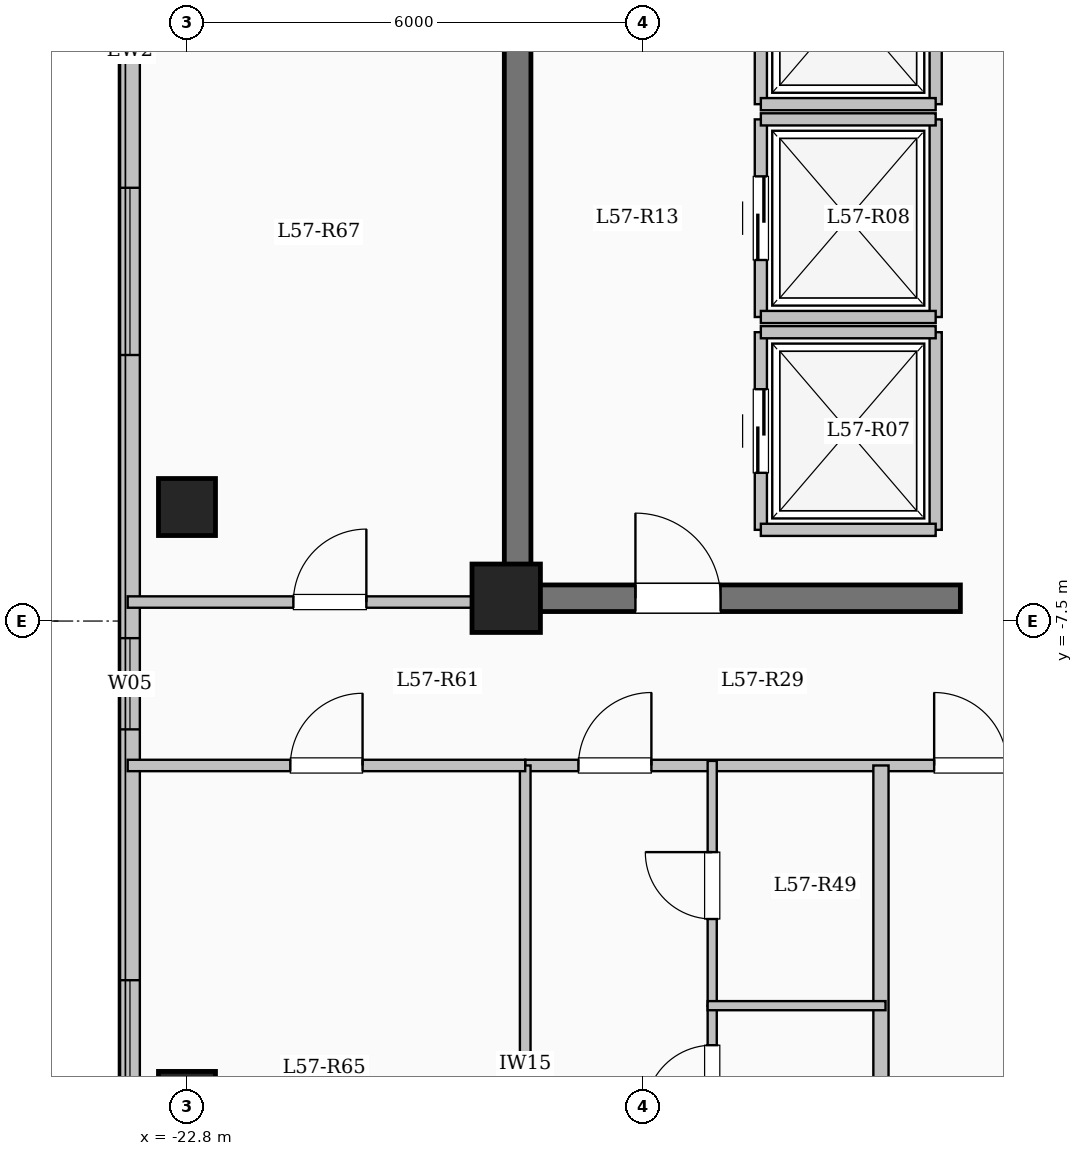
"""IFC4 building model, lengths in metres.
Left out: names, types, materials, properties, quantities, classifications, styles, units other than length and angle.
Written with IfcOpenShell. Run it as: python <this file> out.ifc"""

import sys

from ifc_helpers import new_model, si_unit, direction, frame, frame_2d, origin, origin_2d, place, context, subcontext, project, spatial, rectangle, extrude, element, fill, save


model = new_model("IFC4")
c1 = context("Model", 3, precision=1e-05, world=origin(), true_north=direction((0.0, 1.0)))
c2 = subcontext(c1, "Body", "Model", "MODEL_VIEW")
j1 = project(units=[si_unit("LENGTHUNIT", "METRE"), si_unit("PLANEANGLEUNIT", "RADIAN")], contexts=[c1])
p1 = place(None, origin())
s1 = spatial("IfcSite", under=j1, at=p1, CompositionType="ELEMENT")
p2 = place(p1, origin())
s2 = spatial("IfcBuilding", under=s1, at=p2, CompositionType="ELEMENT")
p3 = place(p2, frame((0.0, 0.0, 210.35)))
s3 = spatial("IfcBuildingStorey", under=s2, at=p3, CompositionType="ELEMENT", Elevation=210.35)
p4 = place(p3, frame((-18.6, -7.2, 0.0), z_axis=(0.0, 0.0, 1.0), x_axis=(1.0, 0.0, 0.0)))
e1 = element("IfcColumn", 1, at=p4, inside=s3, PredefinedType="COLUMN", context=c2, shape_type="SweptSolid", body=[
    extrude(rectangle(XDim=0.9, YDim=0.9, at=origin_2d()), origin(), (0.0, 0.0, 1.0), 3.35),
])
for number, where, z_axis, x_axis in (
    (2, (-22.8, -13.8, 0.0), (0.0, 0.0, 1.0), (1.0, 0.0, 0.0)),
    (3, (-22.8, -6.0, 0.0), (0.0, 0.0, 1.0), (1.0, 0.0, 0.0)),
):
    element("IfcColumn", number, at=place(p3, frame(where, z_axis=z_axis, x_axis=x_axis)), inside=s3, PredefinedType="COLUMN", context=c2, shape_type="SweptSolid", body=[
        extrude(rectangle(XDim=0.75, YDim=0.75, at=origin_2d()), origin(), (0.0, 0.0, 1.0), 3.35),
    ])
p5 = place(p3, frame((-23.55, -17.25, 0.0), z_axis=(0.0, 0.0, 1.0), x_axis=(0.0, 1.0, 0.0)))
e4 = element("IfcWall", 4, at=p5, inside=s3, PredefinedType="SOLIDWALL", context=c2, shape_type="SweptSolid", body=[
    extrude(rectangle(XDim=34.5, YDim=0.26, at=frame_2d((17.25, 0.0))), origin(), (0.0, 0.0, 1.0), 3.1),
])
p6 = place(p5, frame((2.825, 0.0, 0.9)))
e5 = element("IfcOpeningElement", 5, at=p6, cuts=e4, PredefinedType="OPENING", context=c2, shape_type="SweptSolid", body=[
    extrude(rectangle(XDim=2.2, YDim=1.75, at=frame_2d((1.1, 0.875))), frame((0.0, 0.14, 0.0), z_axis=(0.0, -1.0, 0.0), x_axis=(1.0, 0.0, 0.0)), (0.0, 0.0, 1.0), 0.28),
])
p7 = place(p5, frame((8.325, 0.0, 0.95)))
e6 = element("IfcOpeningElement", 6, at=p7, cuts=e4, PredefinedType="OPENING", context=c2, shape_type="SweptSolid", body=[
    extrude(rectangle(XDim=1.2, YDim=1.5, at=frame_2d((0.6, 0.75))), frame((0.0, 0.14, 0.0), z_axis=(0.0, -1.0, 0.0), x_axis=(1.0, 0.0, 0.0)), (0.0, 0.0, 1.0), 0.28),
])
p8 = place(p5, frame((13.25, 0.0, 0.9)))
e7 = element("IfcOpeningElement", 7, at=p8, cuts=e4, PredefinedType="OPENING", context=c2, shape_type="SweptSolid", body=[
    extrude(rectangle(XDim=2.2, YDim=1.75, at=frame_2d((1.1, 0.875))), frame((0.0, 0.14, 0.0), z_axis=(0.0, -1.0, 0.0), x_axis=(1.0, 0.0, 0.0)), (0.0, 0.0, 1.0), 0.28),
])
p9 = place(p5, frame((19.65, 0.0, 0.9)))
e8 = element("IfcOpeningElement", 8, at=p9, cuts=e4, PredefinedType="OPENING", context=c2, shape_type="SweptSolid", body=[
    extrude(rectangle(XDim=1.65, YDim=1.6, at=frame_2d((0.825, 0.8))), frame((0.0, 0.14, 0.0), z_axis=(0.0, -1.0, 0.0), x_axis=(1.0, 0.0, 0.0)), (0.0, 0.0, 1.0), 0.28),
])
p10 = place(p5, frame((24.125, 0.0, 0.9)))
e9 = element("IfcOpeningElement", 9, at=p10, cuts=e4, PredefinedType="OPENING", context=c2, shape_type="SweptSolid", body=[
    extrude(rectangle(XDim=2.0, YDim=1.7, at=frame_2d((1.0, 0.85))), frame((0.0, 0.14, 0.0), z_axis=(0.0, -1.0, 0.0), x_axis=(1.0, 0.0, 0.0)), (0.0, 0.0, 1.0), 0.28),
])
p11 = place(p5, frame((28.375, 0.0, 0.95)))
e10 = element("IfcOpeningElement", 10, at=p11, cuts=e4, PredefinedType="OPENING", context=c2, shape_type="SweptSolid", body=[
    extrude(rectangle(XDim=1.0, YDim=1.5, at=frame_2d((0.5, 0.75))), frame((0.0, 0.14, 0.0), z_axis=(0.0, -1.0, 0.0), x_axis=(1.0, 0.0, 0.0)), (0.0, 0.0, 1.0), 0.28),
])
p12 = place(p5, frame((31.125, 0.0, 0.9)))
e11 = element("IfcOpeningElement", 11, at=p12, cuts=e4, PredefinedType="OPENING", context=c2, shape_type="SweptSolid", body=[
    extrude(rectangle(XDim=2.0, YDim=1.7, at=frame_2d((1.0, 0.85))), frame((0.0, 0.14, 0.0), z_axis=(0.0, -1.0, 0.0), x_axis=(1.0, 0.0, 0.0)), (0.0, 0.0, 1.0), 0.28),
])
p13 = place(p3, frame((-15.25, -6.3, 0.0), z_axis=(0.0, 0.0, 1.0), x_axis=(0.0, 1.0, 0.0)))
e12 = element("IfcWall", 12, at=p13, inside=s3, PredefinedType="SOLIDWALL", context=c2, shape_type="SweptSolid", body=[
    extrude(rectangle(XDim=2.6, YDim=0.16, at=frame_2d((1.3, 0.0))), origin(), (0.0, 0.0, 1.0), 3.1),
])
p14 = place(p13, frame((0.75, 0.0, 0.0)))
e13 = element("IfcOpeningElement", 13, at=p14, cuts=e12, PredefinedType="OPENING", context=c2, shape_type="SweptSolid", body=[
    extrude(rectangle(XDim=1.1, YDim=2.15, at=frame_2d((0.55, 1.075))), frame((0.0, 0.09, 0.0), z_axis=(0.0, -1.0, 0.0), x_axis=(1.0, 0.0, 0.0)), (0.0, 0.0, 1.0), 0.18),
])
p15 = place(p3, frame((-12.95, -6.3, 0.0), z_axis=(0.0, 0.0, 1.0), x_axis=(0.0, 1.0, 0.0)))
e14 = element("IfcWall", 14, at=p15, inside=s3, PredefinedType="SOLIDWALL", context=c2, shape_type="SweptSolid", body=[
    extrude(rectangle(XDim=2.6, YDim=0.16, at=frame_2d((1.3, 0.0))), origin(), (0.0, 0.0, 1.0), 3.1),
])
for number, where, z_axis, x_axis in (
    (15, (-15.25, -6.3, 0.0), (0.0, 0.0, 1.0), (1.0, 0.0, 0.0)),
    (16, (-15.25, -3.7, 0.0), (0.0, 0.0, 1.0), (1.0, 0.0, 0.0)),
):
    element("IfcWall", number, at=place(p3, frame(where, z_axis=z_axis, x_axis=x_axis)), inside=s3, PredefinedType="SOLIDWALL", context=c2, shape_type="SweptSolid", body=[
        extrude(rectangle(XDim=2.3, YDim=0.16, at=frame_2d((1.15, 0.0))), origin(), (0.0, 0.0, 1.0), 3.1),
    ])
p16 = place(p3, frame((-15.25, -3.5, 0.0), z_axis=(0.0, 0.0, 1.0), x_axis=(0.0, 1.0, 0.0)))
e17 = element("IfcWall", 17, at=p16, inside=s3, PredefinedType="SOLIDWALL", context=c2, shape_type="SweptSolid", body=[
    extrude(rectangle(XDim=2.6, YDim=0.16, at=frame_2d((1.3, 0.0))), origin(), (0.0, 0.0, 1.0), 3.1),
])
p17 = place(p16, frame((0.75, 0.0, 0.0)))
e18 = element("IfcOpeningElement", 18, at=p17, cuts=e17, PredefinedType="OPENING", context=c2, shape_type="SweptSolid", body=[
    extrude(rectangle(XDim=1.1, YDim=2.15, at=frame_2d((0.55, 1.075))), frame((0.0, 0.09, 0.0), z_axis=(0.0, -1.0, 0.0), x_axis=(1.0, 0.0, 0.0)), (0.0, 0.0, 1.0), 0.18),
])
p18 = place(p3, frame((-12.95, -3.5, 0.0), z_axis=(0.0, 0.0, 1.0), x_axis=(0.0, 1.0, 0.0)))
e19 = element("IfcWall", 19, at=p18, inside=s3, PredefinedType="SOLIDWALL", context=c2, shape_type="SweptSolid", body=[
    extrude(rectangle(XDim=2.6, YDim=0.16, at=frame_2d((1.3, 0.0))), origin(), (0.0, 0.0, 1.0), 3.1),
])
for number, where, z_axis, x_axis in (
    (20, (-15.25, -3.5, 0.0), (0.0, 0.0, 1.0), (1.0, 0.0, 0.0)),
    (21, (-15.25, -0.9, 0.0), (0.0, 0.0, 1.0), (1.0, 0.0, 0.0)),
):
    element("IfcWall", number, at=place(p3, frame(where, z_axis=z_axis, x_axis=x_axis)), inside=s3, PredefinedType="SOLIDWALL", context=c2, shape_type="SweptSolid", body=[
        extrude(rectangle(XDim=2.3, YDim=0.16, at=frame_2d((1.15, 0.0))), origin(), (0.0, 0.0, 1.0), 3.1),
    ])
p19 = place(p3, frame((-15.25, -0.7, 0.0), z_axis=(0.0, 0.0, 1.0), x_axis=(0.0, 1.0, 0.0)))
e22 = element("IfcWall", 22, at=p19, inside=s3, PredefinedType="SOLIDWALL", context=c2, shape_type="SweptSolid", body=[
    extrude(rectangle(XDim=2.6, YDim=0.16, at=frame_2d((1.3, 0.0))), origin(), (0.0, 0.0, 1.0), 3.1),
])
p20 = place(p19, frame((0.75, 0.0, 0.0)))
e23 = element("IfcOpeningElement", 23, at=p20, cuts=e22, PredefinedType="OPENING", context=c2, shape_type="SweptSolid", body=[
    extrude(rectangle(XDim=1.1, YDim=2.15, at=frame_2d((0.55, 1.075))), frame((0.0, 0.09, 0.0), z_axis=(0.0, -1.0, 0.0), x_axis=(1.0, 0.0, 0.0)), (0.0, 0.0, 1.0), 0.18),
])
p21 = place(p3, frame((-12.95, -0.7, 0.0), z_axis=(0.0, 0.0, 1.0), x_axis=(0.0, 1.0, 0.0)))
e24 = element("IfcWall", 24, at=p21, inside=s3, PredefinedType="SOLIDWALL", context=c2, shape_type="SweptSolid", body=[
    extrude(rectangle(XDim=2.6, YDim=0.16, at=frame_2d((1.3, 0.0))), origin(), (0.0, 0.0, 1.0), 3.1),
])
p22 = place(p3, frame((-15.25, -0.7, 0.0), z_axis=(0.0, 0.0, 1.0), x_axis=(1.0, 0.0, 0.0)))
e25 = element("IfcWall", 25, at=p22, inside=s3, PredefinedType="SOLIDWALL", context=c2, shape_type="SweptSolid", body=[
    extrude(rectangle(XDim=2.3, YDim=0.16, at=frame_2d((1.15, 0.0))), origin(), (0.0, 0.0, 1.0), 3.1),
])
p23 = place(p3, frame((-18.45, -7.375, 0.0), z_axis=(0.0, 0.0, 1.0), x_axis=(0.0, 1.0, 0.0)))
e26 = element("IfcWall", 26, at=p23, inside=s3, PredefinedType="SHEAR", context=c2, shape_type="SweptSolid", body=[
    extrude(rectangle(XDim=14.05, YDim=0.35, at=frame_2d((7.025, 0.0))), origin(), (0.0, 0.0, 1.0), 3.35),
])
p24 = place(p3, frame((-18.625, -7.2, 0.0), z_axis=(0.0, 0.0, 1.0), x_axis=(1.0, 0.0, 0.0)))
e27 = element("IfcWall", 27, at=p24, inside=s3, PredefinedType="SHEAR", context=c2, shape_type="SweptSolid", body=[
    extrude(rectangle(XDim=6.0, YDim=0.35, at=frame_2d((3.0, 0.0))), origin(), (0.0, 0.0, 1.0), 3.35),
])
p25 = place(p24, frame((1.725, 0.0, 0.0)))
e28 = element("IfcOpeningElement", 28, at=p25, cuts=e27, PredefinedType="OPENING", context=c2, shape_type="SweptSolid", body=[
    extrude(rectangle(XDim=1.12, YDim=2.15, at=frame_2d((0.56, 1.075))), frame((0.0, 0.185, 0.0), z_axis=(0.0, -1.0, 0.0), x_axis=(1.0, 0.0, 0.0)), (0.0, 0.0, 1.0), 0.37),
])
p26 = place(p3, frame((-18.35, -9.4, 0.0), z_axis=(0.0, 0.0, 1.0), x_axis=(1.0, 0.0, 0.0)))
e29 = element("IfcWall", 29, at=p26, inside=s3, PredefinedType="PARTITIONING", context=c2, shape_type="SweptSolid", body=[
    extrude(rectangle(XDim=9.8, YDim=0.15, at=frame_2d((4.9, 0.0))), origin(), (0.0, 0.0, 1.0), 3.1),
])
p27 = place(p26, frame((0.7, 0.0, 0.0)))
e30 = element("IfcOpeningElement", 30, at=p27, cuts=e29, PredefinedType="OPENING", context=c2, shape_type="SweptSolid", body=[
    extrude(rectangle(XDim=0.96, YDim=2.15, at=frame_2d((0.48, 1.075))), frame((0.0, 0.085, 0.0), z_axis=(0.0, -1.0, 0.0), x_axis=(1.0, 0.0, 0.0)), (0.0, 0.0, 1.0), 0.17),
])
p28 = place(p26, frame((5.38, 0.0, 0.0)))
e31 = element("IfcOpeningElement", 31, at=p28, cuts=e29, PredefinedType="OPENING", context=c2, shape_type="SweptSolid", body=[
    extrude(rectangle(XDim=0.96, YDim=2.15, at=frame_2d((0.48, 1.075))), frame((0.0, 0.085, 0.0), z_axis=(0.0, -1.0, 0.0), x_axis=(1.0, 0.0, 0.0)), (0.0, 0.0, 1.0), 0.17),
])
p29 = place(p3, frame((-13.67, -20.9, 0.0), z_axis=(0.0, 0.0, 1.0), x_axis=(0.0, 1.0, 0.0)))
e32 = element("IfcWall", 32, at=p29, inside=s3, PredefinedType="SOLIDWALL", context=c2, shape_type="SweptSolid", body=[
    extrude(rectangle(XDim=11.5, YDim=0.2, at=frame_2d((5.75, 0.0))), origin(), (0.0, 0.0, 1.0), 3.1),
])
p30 = place(p3, frame((-15.89, -20.9, 0.0), z_axis=(0.0, 0.0, 1.0), x_axis=(0.0, 1.0, 0.0)))
e33 = element("IfcWall", 33, at=p30, inside=s3, PredefinedType="PARTITIONING", context=c2, shape_type="SweptSolid", body=[
    extrude(rectangle(XDim=8.34, YDim=0.12, at=frame_2d((4.17, 0.0))), origin(), (0.0, 0.0, 1.0), 3.1),
])
p31 = place(p30, frame((6.94, 0.0, 0.0)))
e34 = element("IfcOpeningElement", 34, at=p31, cuts=e33, PredefinedType="OPENING", context=c2, shape_type="SweptSolid", body=[
    extrude(rectangle(XDim=0.88, YDim=2.1, at=frame_2d((0.44, 1.05))), frame((0.0, 0.07, 0.0), z_axis=(0.0, -1.0, 0.0), x_axis=(1.0, 0.0, 0.0)), (0.0, 0.0, 1.0), 0.14),
])
p32 = place(p3, frame((-15.89, -12.56, 0.0), z_axis=(0.0, 0.0, 1.0), x_axis=(0.0, 1.0, 0.0)))
e35 = element("IfcWall", 35, at=p32, inside=s3, PredefinedType="PARTITIONING", context=c2, shape_type="SweptSolid", body=[
    extrude(rectangle(XDim=3.22, YDim=0.12, at=frame_2d((1.61, 0.0))), origin(), (0.0, 0.0, 1.0), 3.1),
])
p33 = place(p32, frame((1.14, 0.0, 0.0)))
e36 = element("IfcOpeningElement", 36, at=p33, cuts=e35, PredefinedType="OPENING", context=c2, shape_type="SweptSolid", body=[
    extrude(rectangle(XDim=0.88, YDim=2.1, at=frame_2d((0.44, 1.05))), frame((0.0, 0.07, 0.0), z_axis=(0.0, -1.0, 0.0), x_axis=(1.0, 0.0, 0.0)), (0.0, 0.0, 1.0), 0.14),
])
p34 = place(p3, frame((-15.95, -12.56, 0.0), z_axis=(0.0, 0.0, 1.0), x_axis=(1.0, 0.0, 0.0)))
e37 = element("IfcWall", 37, at=p34, inside=s3, PredefinedType="PARTITIONING", context=c2, shape_type="SweptSolid", body=[
    extrude(rectangle(XDim=2.34, YDim=0.12, at=frame_2d((1.17, 0.0))), origin(), (0.0, 0.0, 1.0), 2.725),
])
p35 = place(p3, frame((-23.58, -7.25, 0.0), z_axis=(0.0, 0.0, 1.0), x_axis=(1.0, 0.0, 0.0)))
e38 = element("IfcWall", 38, at=p35, inside=s3, PredefinedType="PARTITIONING", context=c2, shape_type="SweptSolid", body=[
    extrude(rectangle(XDim=5.13, YDim=0.15, at=frame_2d((2.565, 0.0))), origin(), (0.0, 0.0, 1.0), 3.1),
])
p36 = place(p35, frame((2.18, 0.0, 0.0)))
e39 = element("IfcOpeningElement", 39, at=p36, cuts=e38, PredefinedType="OPENING", context=c2, shape_type="SweptSolid", body=[
    extrude(rectangle(XDim=0.96, YDim=2.15, at=frame_2d((0.48, 1.075))), frame((0.0, 0.085, 0.0), z_axis=(0.0, -1.0, 0.0), x_axis=(1.0, 0.0, 0.0)), (0.0, 0.0, 1.0), 0.17),
])
p37 = place(p3, frame((-18.35, -17.25, 0.0), z_axis=(0.0, 0.0, 1.0), x_axis=(0.0, 1.0, 0.0)))
e40 = element("IfcWall", 40, at=p37, inside=s3, PredefinedType="PARTITIONING", context=c2, shape_type="SweptSolid", body=[
    extrude(rectangle(XDim=7.85, YDim=0.14, at=frame_2d((3.925, 0.0))), origin(), (0.0, 0.0, 1.0), 3.1),
])
p38 = place(p3, frame((-23.58, -9.4, 0.0), z_axis=(0.0, 0.0, 1.0), x_axis=(1.0, 0.0, 0.0)))
e41 = element("IfcWall", 41, at=p38, inside=s3, PredefinedType="PARTITIONING", context=c2, shape_type="SweptSolid", body=[
    extrude(rectangle(XDim=5.23, YDim=0.15, at=frame_2d((2.615, 0.0))), origin(), (0.0, 0.0, 1.0), 3.1),
])
p39 = place(p38, frame((2.14, 0.0, 0.0)))
e42 = element("IfcOpeningElement", 42, at=p39, cuts=e41, PredefinedType="OPENING", context=c2, shape_type="SweptSolid", body=[
    extrude(rectangle(XDim=0.95, YDim=2.15, at=frame_2d((0.475, 1.075))), frame((0.0, 0.085, 0.0), z_axis=(0.0, -1.0, 0.0), x_axis=(1.0, 0.0, 0.0)), (0.0, 0.0, 1.0), 0.17),
])
p40 = place(p6, origin())
e43 = element("IfcWindow", 43, at=p40, inside=s3, PartitioningType="SINGLE_PANEL", PredefinedType="WINDOW", context=c2, shape_type="SweptSolid", body=[
    extrude(rectangle(XDim=2.2, YDim=1.75, at=frame_2d((1.1, 0.875))), frame((0.0, 0.03, 0.0), z_axis=(0.0, -1.0, 0.0), x_axis=(1.0, 0.0, 0.0)), (0.0, 0.0, 1.0), 0.06),
])
fill(e5, e43)
p41 = place(p7, origin())
e44 = element("IfcWindow", 44, at=p41, inside=s3, PartitioningType="SINGLE_PANEL", PredefinedType="WINDOW", context=c2, shape_type="SweptSolid", body=[
    extrude(rectangle(XDim=1.2, YDim=1.5, at=frame_2d((0.6, 0.75))), frame((0.0, 0.03, 0.0), z_axis=(0.0, -1.0, 0.0), x_axis=(1.0, 0.0, 0.0)), (0.0, 0.0, 1.0), 0.06),
])
fill(e6, e44)
p42 = place(p8, origin())
e45 = element("IfcWindow", 45, at=p42, inside=s3, PartitioningType="SINGLE_PANEL", PredefinedType="WINDOW", context=c2, shape_type="SweptSolid", body=[
    extrude(rectangle(XDim=2.2, YDim=1.75, at=frame_2d((1.1, 0.875))), frame((0.0, 0.03, 0.0), z_axis=(0.0, -1.0, 0.0), x_axis=(1.0, 0.0, 0.0)), (0.0, 0.0, 1.0), 0.06),
])
fill(e7, e45)
p43 = place(p14, origin())
e46 = element("IfcDoor", 46, at=p43, inside=s3, OperationType="SLIDING_TO_LEFT", PredefinedType="DOOR", context=c2, shape_type="SweptSolid", body=[
    extrude(rectangle(XDim=1.1, YDim=2.15, at=frame_2d((0.55, 1.075))), frame((0.0, 0.025, 0.0), z_axis=(0.0, -1.0, 0.0), x_axis=(1.0, 0.0, 0.0)), (0.0, 0.0, 1.0), 0.05),
])
fill(e13, e46)
p44 = place(p17, origin())
e47 = element("IfcDoor", 47, at=p44, inside=s3, OperationType="SLIDING_TO_LEFT", PredefinedType="DOOR", context=c2, shape_type="SweptSolid", body=[
    extrude(rectangle(XDim=1.1, YDim=2.15, at=frame_2d((0.55, 1.075))), frame((0.0, 0.025, 0.0), z_axis=(0.0, -1.0, 0.0), x_axis=(1.0, 0.0, 0.0)), (0.0, 0.0, 1.0), 0.05),
])
fill(e18, e47)
p45 = place(p25, origin())
e48 = element("IfcDoor", 48, at=p45, inside=s3, OperationType="SINGLE_SWING_LEFT", PredefinedType="DOOR", context=c2, shape_type="SweptSolid", body=[
    extrude(rectangle(XDim=1.12, YDim=2.15, at=frame_2d((0.56, 1.075))), frame((0.0, 0.025, 0.0), z_axis=(0.0, -1.0, 0.0), x_axis=(1.0, 0.0, 0.0)), (0.0, 0.0, 1.0), 0.05),
])
fill(e28, e48)
p46 = place(p27, origin())
e49 = element("IfcDoor", 49, at=p46, inside=s3, OperationType="SINGLE_SWING_RIGHT", PredefinedType="DOOR", context=c2, shape_type="SweptSolid", body=[
    extrude(rectangle(XDim=0.96, YDim=2.15, at=frame_2d((0.48, 1.075))), frame((0.0, 0.025, 0.0), z_axis=(0.0, -1.0, 0.0), x_axis=(1.0, 0.0, 0.0)), (0.0, 0.0, 1.0), 0.05),
])
fill(e30, e49)
p47 = place(p31, origin())
e50 = element("IfcDoor", 50, at=p47, inside=s3, OperationType="SINGLE_SWING_LEFT", PredefinedType="DOOR", context=c2, shape_type="SweptSolid", body=[
    extrude(rectangle(XDim=0.88, YDim=2.1, at=frame_2d((0.44, 1.05))), frame((0.0, 0.025, 0.0), z_axis=(0.0, -1.0, 0.0), x_axis=(1.0, 0.0, 0.0)), (0.0, 0.0, 1.0), 0.05),
])
fill(e34, e50)
p48 = place(p33, origin())
e51 = element("IfcDoor", 51, at=p48, inside=s3, OperationType="SINGLE_SWING_RIGHT", PredefinedType="DOOR", context=c2, shape_type="SweptSolid", body=[
    extrude(rectangle(XDim=0.88, YDim=2.1, at=frame_2d((0.44, 1.05))), frame((0.0, 0.025, 0.0), z_axis=(0.0, -1.0, 0.0), x_axis=(1.0, 0.0, 0.0)), (0.0, 0.0, 1.0), 0.05),
])
fill(e36, e51)
p49 = place(p28, origin())
e52 = element("IfcDoor", 52, at=p49, inside=s3, OperationType="SINGLE_SWING_LEFT", PredefinedType="DOOR", context=c2, shape_type="SweptSolid", body=[
    extrude(rectangle(XDim=0.96, YDim=2.15, at=frame_2d((0.48, 1.075))), frame((0.0, 0.025, 0.0), z_axis=(0.0, -1.0, 0.0), x_axis=(1.0, 0.0, 0.0)), (0.0, 0.0, 1.0), 0.05),
])
fill(e31, e52)
p50 = place(p39, origin())
e53 = element("IfcDoor", 53, at=p50, inside=s3, OperationType="SINGLE_SWING_RIGHT", PredefinedType="DOOR", context=c2, shape_type="SweptSolid", body=[
    extrude(rectangle(XDim=0.95, YDim=2.15, at=frame_2d((0.475, 1.075))), frame((0.0, 0.025, 0.0), z_axis=(0.0, -1.0, 0.0), x_axis=(1.0, 0.0, 0.0)), (0.0, 0.0, 1.0), 0.05),
])
fill(e42, e53)
p51 = place(p36, origin())
e54 = element("IfcDoor", 54, at=p51, inside=s3, OperationType="SINGLE_SWING_RIGHT", PredefinedType="DOOR", context=c2, shape_type="SweptSolid", body=[
    extrude(rectangle(XDim=0.96, YDim=2.15, at=frame_2d((0.48, 1.075))), frame((0.0, 0.025, 0.0), z_axis=(0.0, -1.0, 0.0), x_axis=(1.0, 0.0, 0.0)), (0.0, 0.0, 1.0), 0.05),
])
fill(e39, e54)
save(model, sys.argv[1])
